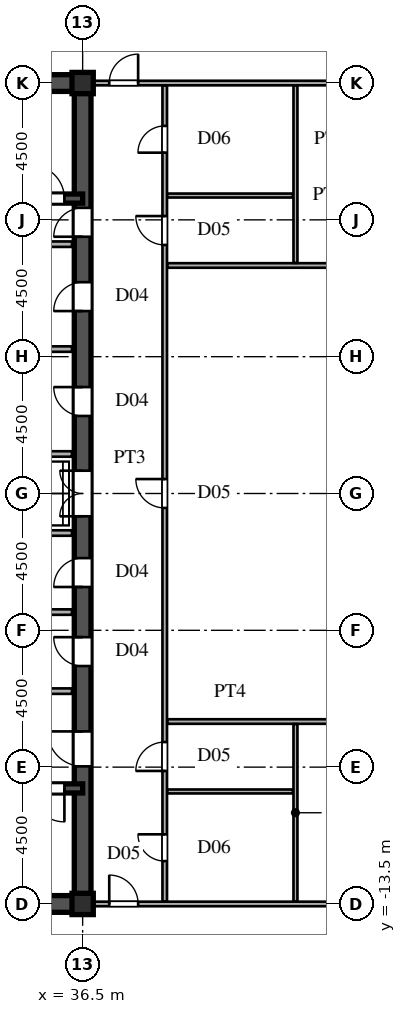
"""IFC4 building model, lengths in metres.
Left out: names, types, materials, properties, quantities, classifications, styles, units other than length and angle.
Written with IfcOpenShell. Run it as: python <this file> out.ifc"""

import sys

from ifc_helpers import new_model, si_unit, direction, frame, frame_2d, origin, origin_2d, place, context, subcontext, project, spatial, rectangle, i_section, extrude, source, transform, mapped, element, fill, save


model = new_model("IFC4")
c1 = context("Model", 3, precision=1e-05, world=origin(), true_north=direction((0.0, 1.0)))
c2 = subcontext(c1, "Body", "Model", "MODEL_VIEW")
j1 = project(units=[si_unit("LENGTHUNIT", "METRE"), si_unit("PLANEANGLEUNIT", "RADIAN")], contexts=[c1])
p1 = place(None, origin())
s1 = spatial("IfcSite", under=j1, at=p1, CompositionType="ELEMENT")
p2 = place(p1, origin())
s2 = spatial("IfcBuilding", under=s1, at=p2, CompositionType="ELEMENT")
p3 = place(p2, frame((0.0, 0.0, 135.6)))
s3 = spatial("IfcBuildingStorey", under=s2, at=p3, CompositionType="ELEMENT", Elevation=135.6)
m1 = source(origin(), c2, "Body", "SweptSolid", [
    extrude(i_section(OverallWidth=0.7, OverallDepth=0.7, WebThickness=0.028, FlangeThickness=0.045, at=origin_2d()), origin(), (0.0, 0.0, 1.0), 4.8),
])
for number, where, z_axis, x_axis in (
    (1, (36.5, -13.5, 0.0), (0.0, 0.0, 1.0), (1.0, 0.0, 0.0)),
    (2, (36.5, 13.5, 0.0), (0.0, 0.0, 1.0), (1.0, 0.0, 0.0)),
):
    element("IfcColumn", number, at=place(p3, frame(where, z_axis=z_axis, x_axis=x_axis)), inside=s3, PredefinedType="COLUMN", context=c2, shape_type="MappedRepresentation", body=[
        mapped(m1, transform((0.0, 0.0, 0.0), scale=1.0)),
    ])
for number, where, z_axis, x_axis in (
    (3, (27.5, -13.5, 0.0), (0.0, 0.0, 1.0), (1.0, 0.0, 0.0)),
    (4, (27.5, 13.5, 0.0), (0.0, 0.0, 1.0), (1.0, 0.0, 0.0)),
):
    element("IfcWall", number, at=place(p3, frame(where, z_axis=z_axis, x_axis=x_axis)), inside=s3, PredefinedType="SHEAR", context=c2, shape_type="SweptSolid", body=[
        extrude(rectangle(XDim=9.0, YDim=0.55, at=frame_2d((4.5, 0.0))), origin(), (0.0, 0.0, 1.0), 4.58),
    ])
p4 = place(p3, frame((36.5, -13.65, 0.0), z_axis=(0.0, 0.0, 1.0), x_axis=(0.0, 1.0, 0.0)))
e5 = element("IfcWall", 5, at=p4, inside=s3, PredefinedType="SHEAR", context=c2, shape_type="SweptSolid", body=[
    extrude(rectangle(XDim=7.15, YDim=0.55, at=frame_2d((3.575, 0.0))), origin(), (0.0, 0.0, 1.0), 4.58),
])
p5 = place(p4, frame((4.675, 0.0, 0.0)))
e6 = element("IfcOpeningElement", 6, at=p5, cuts=e5, PredefinedType="OPENING", context=c2, shape_type="SweptSolid", body=[
    extrude(rectangle(XDim=1.15, YDim=2.2, at=frame_2d((0.575, 1.1))), frame((0.0, 0.285, 0.0), z_axis=(0.0, -1.0, 0.0), x_axis=(1.0, 0.0, 0.0)), (0.0, 0.0, 1.0), 0.57),
])
p6 = place(p3, frame((36.5, -1.3, 0.0), z_axis=(0.0, 0.0, 1.0), x_axis=(0.0, 1.0, 0.0)))
e7 = element("IfcWall", 7, at=p6, inside=s3, PredefinedType="SHEAR", context=c2, shape_type="SweptSolid", body=[
    extrude(rectangle(XDim=2.6, YDim=0.55, at=frame_2d((1.3, 0.0))), origin(), (0.0, 0.0, 1.0), 4.58),
])
p7 = place(p6, frame((0.55, 0.0, 0.0)))
e8 = element("IfcOpeningElement", 8, at=p7, cuts=e7, PredefinedType="OPENING", context=c2, shape_type="SweptSolid", body=[
    extrude(rectangle(XDim=1.5, YDim=2.3, at=frame_2d((0.75, 1.15))), frame((0.0, 0.285, 0.0), z_axis=(0.0, -1.0, 0.0), x_axis=(1.0, 0.0, 0.0)), (0.0, 0.0, 1.0), 0.57),
])
p8 = place(p3, frame((36.5, 8.2, 0.0), z_axis=(0.0, 0.0, 1.0), x_axis=(0.0, 1.0, 0.0)))
e9 = element("IfcWall", 9, at=p8, inside=s3, PredefinedType="SHEAR", context=c2, shape_type="SweptSolid", body=[
    extrude(rectangle(XDim=5.45, YDim=0.55, at=frame_2d((2.725, 0.0))), origin(), (0.0, 0.0, 1.0), 4.58),
])
p9 = place(p8, frame((0.245, 0.0, 0.0)))
e10 = element("IfcOpeningElement", 10, at=p9, cuts=e9, PredefinedType="OPENING", context=c2, shape_type="SweptSolid", body=[
    extrude(rectangle(XDim=0.95, YDim=2.15, at=frame_2d((0.475, 1.075))), frame((0.0, 0.285, 0.0), z_axis=(0.0, -1.0, 0.0), x_axis=(1.0, 0.0, 0.0)), (0.0, 0.0, 1.0), 0.57),
])
p10 = place(p3, frame((36.5, -6.5, 0.0), z_axis=(0.0, 0.0, 1.0), x_axis=(0.0, 1.0, 0.0)))
e11 = element("IfcWall", 11, at=p10, inside=s3, PredefinedType="SHEAR", context=c2, shape_type="SweptSolid", body=[
    extrude(rectangle(XDim=2.6, YDim=0.55, at=frame_2d((1.3, 0.0))), origin(), (0.0, 0.0, 1.0), 4.58),
])
p11 = place(p10, frame((0.825, 0.0, 0.0)))
e12 = element("IfcOpeningElement", 12, at=p11, cuts=e11, PredefinedType="OPENING", context=c2, shape_type="SweptSolid", body=[
    extrude(rectangle(XDim=0.95, YDim=2.15, at=frame_2d((0.475, 1.075))), frame((0.0, 0.285, 0.0), z_axis=(0.0, -1.0, 0.0), x_axis=(1.0, 0.0, 0.0)), (0.0, 0.0, 1.0), 0.57),
])
p12 = place(p3, frame((36.5, -3.9, 0.0), z_axis=(0.0, 0.0, 1.0), x_axis=(0.0, 1.0, 0.0)))
e13 = element("IfcWall", 13, at=p12, inside=s3, PredefinedType="SHEAR", context=c2, shape_type="SweptSolid", body=[
    extrude(rectangle(XDim=2.6, YDim=0.55, at=frame_2d((1.3, 0.0))), origin(), (0.0, 0.0, 1.0), 4.58),
])
p13 = place(p12, frame((0.825, 0.0, 0.0)))
e14 = element("IfcOpeningElement", 14, at=p13, cuts=e13, PredefinedType="OPENING", context=c2, shape_type="SweptSolid", body=[
    extrude(rectangle(XDim=0.95, YDim=2.15, at=frame_2d((0.475, 1.075))), frame((0.0, 0.285, 0.0), z_axis=(0.0, -1.0, 0.0), x_axis=(1.0, 0.0, 0.0)), (0.0, 0.0, 1.0), 0.57),
])
p14 = place(p3, frame((36.5, 1.3, 0.0), z_axis=(0.0, 0.0, 1.0), x_axis=(0.0, 1.0, 0.0)))
e15 = element("IfcWall", 15, at=p14, inside=s3, PredefinedType="SHEAR", context=c2, shape_type="SweptSolid", body=[
    extrude(rectangle(XDim=3.45, YDim=0.55, at=frame_2d((1.725, 0.0))), origin(), (0.0, 0.0, 1.0), 4.58),
])
p15 = place(p14, frame((1.25, 0.0, 0.0)))
e16 = element("IfcOpeningElement", 16, at=p15, cuts=e15, PredefinedType="OPENING", context=c2, shape_type="SweptSolid", body=[
    extrude(rectangle(XDim=0.95, YDim=2.15, at=frame_2d((0.475, 1.075))), frame((0.0, 0.285, 0.0), z_axis=(0.0, -1.0, 0.0), x_axis=(1.0, 0.0, 0.0)), (0.0, 0.0, 1.0), 0.57),
])
p16 = place(p3, frame((36.5, 4.75, 0.0), z_axis=(0.0, 0.0, 1.0), x_axis=(0.0, 1.0, 0.0)))
e17 = element("IfcWall", 17, at=p16, inside=s3, PredefinedType="SHEAR", context=c2, shape_type="SweptSolid", body=[
    extrude(rectangle(XDim=3.45, YDim=0.55, at=frame_2d((1.725, 0.0))), origin(), (0.0, 0.0, 1.0), 4.58),
])
p17 = place(p16, frame((1.25, 0.0, 0.0)))
e18 = element("IfcOpeningElement", 18, at=p17, cuts=e17, PredefinedType="OPENING", context=c2, shape_type="SweptSolid", body=[
    extrude(rectangle(XDim=0.95, YDim=2.15, at=frame_2d((0.475, 1.075))), frame((0.0, 0.285, 0.0), z_axis=(0.0, -1.0, 0.0), x_axis=(1.0, 0.0, 0.0)), (0.0, 0.0, 1.0), 0.57),
])
p18 = place(p3, frame((27.5, -9.7, 0.0), z_axis=(0.0, 0.0, 1.0), x_axis=(1.0, 0.0, 0.0)))
e19 = element("IfcWall", 19, at=p18, inside=s3, PredefinedType="SHEAR", context=c2, shape_type="SweptSolid", body=[
    extrude(rectangle(XDim=9.0, YDim=0.3, at=frame_2d((4.5, 0.0))), origin(), (0.0, 0.0, 1.0), 4.58),
])
p19 = place(p18, frame((7.3, 0.0, 0.0)))
e20 = element("IfcOpeningElement", 20, at=p19, cuts=e19, PredefinedType="OPENING", context=c2, shape_type="SweptSolid", body=[
    extrude(rectangle(XDim=1.1, YDim=2.2, at=frame_2d((0.55, 1.1))), frame((0.0, 0.16, 0.0), z_axis=(0.0, -1.0, 0.0), x_axis=(1.0, 0.0, 0.0)), (0.0, 0.0, 1.0), 0.32),
])
p20 = place(p3, frame((27.5, 9.7, 0.0), z_axis=(0.0, 0.0, 1.0), x_axis=(1.0, 0.0, 0.0)))
e21 = element("IfcWall", 21, at=p20, inside=s3, PredefinedType="SHEAR", context=c2, shape_type="SweptSolid", body=[
    extrude(rectangle(XDim=9.0, YDim=0.3, at=frame_2d((4.5, 0.0))), origin(), (0.0, 0.0, 1.0), 4.58),
])
p21 = place(p20, frame((7.3, 0.0, 0.0)))
e22 = element("IfcOpeningElement", 22, at=p21, cuts=e21, PredefinedType="OPENING", context=c2, shape_type="SweptSolid", body=[
    extrude(rectangle(XDim=1.1, YDim=2.2, at=frame_2d((0.55, 1.1))), frame((0.0, 0.16, 0.0), z_axis=(0.0, -1.0, 0.0), x_axis=(1.0, 0.0, 0.0)), (0.0, 0.0, 1.0), 0.32),
])
for number, where, z_axis, x_axis in (
    (23, (30.45, -6.5, 0.0), (0.0, 0.0, 1.0), (1.0, 0.0, 0.0)),
    (24, (30.45, 8.2, 0.0), (0.0, 0.0, 1.0), (1.0, 0.0, 0.0)),
):
    element("IfcWall", number, at=place(p3, frame(where, z_axis=z_axis, x_axis=x_axis)), inside=s3, PredefinedType="PARTITIONING", context=c2, shape_type="SweptSolid", body=[
        extrude(rectangle(XDim=5.7, YDim=0.18, at=frame_2d((2.85, 0.0))), origin(), (0.0, 0.0, 1.0), 4.58),
    ])
for number, where, z_axis, x_axis in (
    (25, (33.2, -1.3, 0.0), (0.0, 0.0, 1.0), (1.0, 0.0, 0.0)),
    (26, (33.2, 1.3, 0.0), (0.0, 0.0, 1.0), (1.0, 0.0, 0.0)),
    (27, (33.2, -3.9, 0.0), (0.0, 0.0, 1.0), (1.0, 0.0, 0.0)),
    (28, (33.2, 4.75, 0.0), (0.0, 0.0, 1.0), (1.0, 0.0, 0.0)),
):
    element("IfcWall", number, at=place(p3, frame(where, z_axis=z_axis, x_axis=x_axis)), inside=s3, PredefinedType="PARTITIONING", context=c2, shape_type="SweptSolid", body=[
        extrude(rectangle(XDim=2.95, YDim=0.18, at=frame_2d((1.475, 0.0))), origin(), (0.0, 0.0, 1.0), 4.58),
    ])
p22 = place(p3, frame((36.78, -13.5, 0.0), z_axis=(0.0, 0.0, 1.0), x_axis=(1.0, 0.0, 0.0)))
e29 = element("IfcWall", 29, at=p22, inside=s3, PredefinedType="PARTITIONING", context=c2, shape_type="SweptSolid", body=[
    extrude(rectangle(XDim=16.167, YDim=0.15, at=frame_2d((8.083, 0.0))), origin(), (0.0, 0.0, 1.0), 3.98),
])
p23 = place(p22, frame((0.595, 0.0, 0.0)))
e30 = element("IfcOpeningElement", 30, at=p23, cuts=e29, PredefinedType="OPENING", context=c2, shape_type="SweptSolid", body=[
    extrude(rectangle(XDim=0.95, YDim=2.15, at=frame_2d((0.475, 1.075))), frame((0.0, 0.085, 0.0), z_axis=(0.0, -1.0, 0.0), x_axis=(1.0, 0.0, 0.0)), (0.0, 0.0, 1.0), 0.17),
])
p24 = place(p3, frame((39.285, -9.8, 0.0), z_axis=(0.0, 0.0, 1.0), x_axis=(1.0, 0.0, 0.0)))
e31 = element("IfcWall", 31, at=p24, inside=s3, PredefinedType="PARTITIONING", context=c2, shape_type="SweptSolid", body=[
    extrude(rectangle(XDim=4.13, YDim=0.13, at=frame_2d((2.065, 0.0))), origin(), (0.0, 0.0, 1.0), 4.58),
])
p25 = place(p3, frame((39.285, -7.5, 0.0), z_axis=(0.0, 0.0, 1.0), x_axis=(1.0, 0.0, 0.0)))
e32 = element("IfcWall", 32, at=p25, inside=s3, PredefinedType="PARTITIONING", context=c2, shape_type="SweptSolid", body=[
    extrude(rectangle(XDim=25.354, YDim=0.15, at=frame_2d((12.677, 0.0))), origin(), (0.0, 0.0, 1.0), 4.58),
])
p26 = place(p25, frame((9.49, 0.0, 0.0)))
e33 = element("IfcOpeningElement", 33, at=p26, cuts=e32, PredefinedType="OPENING", context=c2, shape_type="SweptSolid", body=[
    extrude(rectangle(XDim=0.95, YDim=2.15, at=frame_2d((0.475, 1.075))), frame((0.0, 0.085, 0.0), z_axis=(0.0, -1.0, 0.0), x_axis=(1.0, 0.0, 0.0)), (0.0, 0.0, 1.0), 0.17),
])
p27 = place(p3, frame((39.285, 7.5, 0.0), z_axis=(0.0, 0.0, 1.0), x_axis=(1.0, 0.0, 0.0)))
e34 = element("IfcWall", 34, at=p27, inside=s3, PredefinedType="PARTITIONING", context=c2, shape_type="SweptSolid", body=[
    extrude(rectangle(XDim=25.354, YDim=0.15, at=frame_2d((12.677, 0.0))), origin(), (0.0, 0.0, 1.0), 4.58),
])
p28 = place(p27, frame((9.49, 0.0, 0.0)))
e35 = element("IfcOpeningElement", 35, at=p28, cuts=e34, PredefinedType="OPENING", context=c2, shape_type="SweptSolid", body=[
    extrude(rectangle(XDim=0.95, YDim=2.15, at=frame_2d((0.475, 1.075))), frame((0.0, 0.085, 0.0), z_axis=(0.0, -1.0, 0.0), x_axis=(1.0, 0.0, 0.0)), (0.0, 0.0, 1.0), 0.17),
])
p29 = place(p3, frame((39.285, 9.8, 0.0), z_axis=(0.0, 0.0, 1.0), x_axis=(1.0, 0.0, 0.0)))
e36 = element("IfcWall", 36, at=p29, inside=s3, PredefinedType="PARTITIONING", context=c2, shape_type="SweptSolid", body=[
    extrude(rectangle(XDim=4.13, YDim=0.13, at=frame_2d((2.065, 0.0))), origin(), (0.0, 0.0, 1.0), 4.58),
])
p30 = place(p3, frame((36.78, 13.5, 0.0), z_axis=(0.0, 0.0, 1.0), x_axis=(1.0, 0.0, 0.0)))
e37 = element("IfcWall", 37, at=p30, inside=s3, PredefinedType="PARTITIONING", context=c2, shape_type="SweptSolid", body=[
    extrude(rectangle(XDim=16.167, YDim=0.15, at=frame_2d((8.083, 0.0))), origin(), (0.0, 0.0, 1.0), 3.98),
])
p31 = place(p30, frame((0.595, 0.0, 0.0)))
e38 = element("IfcOpeningElement", 38, at=p31, cuts=e37, PredefinedType="OPENING", context=c2, shape_type="SweptSolid", body=[
    extrude(rectangle(XDim=0.95, YDim=2.15, at=frame_2d((0.475, 1.075))), frame((0.0, 0.085, 0.0), z_axis=(0.0, -1.0, 0.0), x_axis=(1.0, 0.0, 0.0)), (0.0, 0.0, 1.0), 0.17),
])
p32 = place(p3, frame((39.2, -13.415, 0.0), z_axis=(0.0, 0.0, 1.0), x_axis=(0.0, 1.0, 0.0)))
e39 = element("IfcWall", 39, at=p32, inside=s3, PredefinedType="PARTITIONING", context=c2, shape_type="SweptSolid", body=[
    extrude(rectangle(XDim=26.83, YDim=0.15, at=frame_2d((13.415, 0.0))), origin(), (0.0, 0.0, 1.0), 4.58),
])
p33 = place(p32, frame((12.94, 0.0, 0.0)))
e40 = element("IfcOpeningElement", 40, at=p33, cuts=e39, PredefinedType="OPENING", context=c2, shape_type="SweptSolid", body=[
    extrude(rectangle(XDim=0.95, YDim=2.15, at=frame_2d((0.475, 1.075))), frame((0.0, 0.085, 0.0), z_axis=(0.0, -1.0, 0.0), x_axis=(1.0, 0.0, 0.0)), (0.0, 0.0, 1.0), 0.17),
])
p34 = place(p32, frame((1.325, 0.0, 0.0)))
e41 = element("IfcOpeningElement", 41, at=p34, cuts=e39, PredefinedType="OPENING", context=c2, shape_type="SweptSolid", body=[
    extrude(rectangle(XDim=0.88, YDim=2.1, at=frame_2d((0.44, 1.05))), frame((0.0, 0.085, 0.0), z_axis=(0.0, -1.0, 0.0), x_axis=(1.0, 0.0, 0.0)), (0.0, 0.0, 1.0), 0.17),
])
p35 = place(p32, frame((4.29, 0.0, 0.0)))
e42 = element("IfcOpeningElement", 42, at=p35, cuts=e39, PredefinedType="OPENING", context=c2, shape_type="SweptSolid", body=[
    extrude(rectangle(XDim=0.95, YDim=2.15, at=frame_2d((0.475, 1.075))), frame((0.0, 0.085, 0.0), z_axis=(0.0, -1.0, 0.0), x_axis=(1.0, 0.0, 0.0)), (0.0, 0.0, 1.0), 0.17),
])
p36 = place(p32, frame((21.59, 0.0, 0.0)))
e43 = element("IfcOpeningElement", 43, at=p36, cuts=e39, PredefinedType="OPENING", context=c2, shape_type="SweptSolid", body=[
    extrude(rectangle(XDim=0.95, YDim=2.15, at=frame_2d((0.475, 1.075))), frame((0.0, 0.085, 0.0), z_axis=(0.0, -1.0, 0.0), x_axis=(1.0, 0.0, 0.0)), (0.0, 0.0, 1.0), 0.17),
])
p37 = place(p32, frame((24.625, 0.0, 0.0)))
e44 = element("IfcOpeningElement", 44, at=p37, cuts=e39, PredefinedType="OPENING", context=c2, shape_type="SweptSolid", body=[
    extrude(rectangle(XDim=0.88, YDim=2.1, at=frame_2d((0.44, 1.05))), frame((0.0, 0.085, 0.0), z_axis=(0.0, -1.0, 0.0), x_axis=(1.0, 0.0, 0.0)), (0.0, 0.0, 1.0), 0.17),
])
for number, where, z_axis, x_axis in (
    (45, (43.5, -13.415, 0.0), (0.0, 0.0, 1.0), (0.0, 1.0, 0.0)),
    (46, (43.5, 7.585, 0.0), (0.0, 0.0, 1.0), (0.0, 1.0, 0.0)),
):
    element("IfcWall", number, at=place(p3, frame(where, z_axis=z_axis, x_axis=x_axis)), inside=s3, PredefinedType="PARTITIONING", context=c2, shape_type="SweptSolid", body=[
        extrude(rectangle(XDim=5.83, YDim=0.13, at=frame_2d((2.915, 0.0))), origin(), (0.0, 0.0, 1.0), 4.58),
    ])
m2 = source(origin(), c2, "Body", "SweptSolid", [
    extrude(rectangle(XDim=1.15, YDim=2.2, at=frame_2d((0.575, 1.1))), frame((0.0, 0.025, 0.0), z_axis=(0.0, -1.0, 0.0), x_axis=(1.0, 0.0, 0.0)), (0.0, 0.0, 1.0), 0.05),
])
p38 = place(p5, origin())
e47 = element("IfcDoor", 47, at=p38, inside=s3, OperationType="SINGLE_SWING_RIGHT", PredefinedType="DOOR", context=c2, shape_type="MappedRepresentation", body=[
    mapped(m2, transform((0.0, 0.0, 0.0), scale=1.0)),
])
fill(e6, e47)
m3 = source(origin(), c2, "Body", "SweptSolid", [
    extrude(rectangle(XDim=1.5, YDim=2.3, at=frame_2d((0.75, 1.15))), frame((0.0, 0.025, 0.0), z_axis=(0.0, -1.0, 0.0), x_axis=(1.0, 0.0, 0.0)), (0.0, 0.0, 1.0), 0.05),
])
p39 = place(p7, origin())
e48 = element("IfcDoor", 48, at=p39, inside=s3, OperationType="DOUBLE_SWING_LEFT", PredefinedType="DOOR", context=c2, shape_type="MappedRepresentation", body=[
    mapped(m3, transform((0.0, 0.0, 0.0), scale=1.0)),
])
fill(e8, e48)
m4 = source(origin(), c2, "Body", "SweptSolid", [
    extrude(rectangle(XDim=0.95, YDim=2.15, at=frame_2d((0.475, 1.075))), frame((0.0, 0.025, 0.0), z_axis=(0.0, -1.0, 0.0), x_axis=(1.0, 0.0, 0.0)), (0.0, 0.0, 1.0), 0.05),
])
p40 = place(p9, origin())
e49 = element("IfcDoor", 49, at=p40, inside=s3, OperationType="SINGLE_SWING_LEFT", PredefinedType="DOOR", context=c2, shape_type="MappedRepresentation", body=[
    mapped(m4, transform((0.0, 0.0, 0.0), scale=1.0)),
])
fill(e10, e49)
p41 = place(p11, origin())
e50 = element("IfcDoor", 50, at=p41, inside=s3, OperationType="SINGLE_SWING_RIGHT", PredefinedType="DOOR", context=c2, shape_type="MappedRepresentation", body=[
    mapped(m4, transform((0.0, 0.0, 0.0), scale=1.0)),
])
fill(e12, e50)
p42 = place(p13, origin())
e51 = element("IfcDoor", 51, at=p42, inside=s3, OperationType="SINGLE_SWING_LEFT", PredefinedType="DOOR", context=c2, shape_type="MappedRepresentation", body=[
    mapped(m4, transform((0.0, 0.0, 0.0), scale=1.0)),
])
fill(e14, e51)
p43 = place(p15, origin())
e52 = element("IfcDoor", 52, at=p43, inside=s3, OperationType="SINGLE_SWING_RIGHT", PredefinedType="DOOR", context=c2, shape_type="MappedRepresentation", body=[
    mapped(m4, transform((0.0, 0.0, 0.0), scale=1.0)),
])
fill(e16, e52)
p44 = place(p17, origin())
e53 = element("IfcDoor", 53, at=p44, inside=s3, OperationType="SINGLE_SWING_LEFT", PredefinedType="DOOR", context=c2, shape_type="MappedRepresentation", body=[
    mapped(m4, transform((0.0, 0.0, 0.0), scale=1.0)),
])
fill(e18, e53)
m5 = source(origin(), c2, "Body", "SweptSolid", [
    extrude(rectangle(XDim=1.1, YDim=2.2, at=frame_2d((0.55, 1.1))), frame((0.0, 0.025, 0.0), z_axis=(0.0, -1.0, 0.0), x_axis=(1.0, 0.0, 0.0)), (0.0, 0.0, 1.0), 0.05),
])
p45 = place(p19, frame((1.1, 0.0, 0.0), z_axis=(0.0, 0.0, 1.0), x_axis=(-1.0, 0.0, 0.0)))
e54 = element("IfcDoor", 54, at=p45, inside=s3, OperationType="SINGLE_SWING_RIGHT", PredefinedType="DOOR", context=c2, shape_type="MappedRepresentation", body=[
    mapped(m5, transform((0.0, 0.0, 0.0), scale=1.0)),
])
fill(e20, e54)
p46 = place(p21, origin())
e55 = element("IfcDoor", 55, at=p46, inside=s3, OperationType="SINGLE_SWING_LEFT", PredefinedType="DOOR", context=c2, shape_type="MappedRepresentation", body=[
    mapped(m5, transform((0.0, 0.0, 0.0), scale=1.0)),
])
fill(e22, e55)
m6 = source(origin(), c2, "Body", "SweptSolid", [
    extrude(rectangle(XDim=0.95, YDim=2.15, at=frame_2d((0.475, 1.075))), frame((0.0, 0.025, 0.0), z_axis=(0.0, -1.0, 0.0), x_axis=(1.0, 0.0, 0.0)), (0.0, 0.0, 1.0), 0.05),
])
p47 = place(p23, origin())
e56 = element("IfcDoor", 56, at=p47, inside=s3, OperationType="SINGLE_SWING_LEFT", PredefinedType="DOOR", context=c2, shape_type="MappedRepresentation", body=[
    mapped(m6, transform((0.0, 0.0, 0.0), scale=1.0)),
])
fill(e30, e56)
p48 = place(p31, origin())
e57 = element("IfcDoor", 57, at=p48, inside=s3, OperationType="SINGLE_SWING_RIGHT", PredefinedType="DOOR", context=c2, shape_type="MappedRepresentation", body=[
    mapped(m6, transform((0.0, 0.0, 0.0), scale=1.0)),
])
fill(e38, e57)
p49 = place(p33, origin())
e58 = element("IfcDoor", 58, at=p49, inside=s3, OperationType="SINGLE_SWING_RIGHT", PredefinedType="DOOR", context=c2, shape_type="MappedRepresentation", body=[
    mapped(m6, transform((0.0, 0.0, 0.0), scale=1.0)),
])
fill(e40, e58)
m7 = source(origin(), c2, "Body", "SweptSolid", [
    extrude(rectangle(XDim=0.88, YDim=2.1, at=frame_2d((0.44, 1.05))), frame((0.0, 0.025, 0.0), z_axis=(0.0, -1.0, 0.0), x_axis=(1.0, 0.0, 0.0)), (0.0, 0.0, 1.0), 0.05),
])
p50 = place(p34, origin())
e59 = element("IfcDoor", 59, at=p50, inside=s3, OperationType="SINGLE_SWING_RIGHT", PredefinedType="DOOR", context=c2, shape_type="MappedRepresentation", body=[
    mapped(m7, transform((0.0, 0.0, 0.0), scale=1.0)),
])
fill(e41, e59)
p51 = place(p35, origin())
e60 = element("IfcDoor", 60, at=p51, inside=s3, OperationType="SINGLE_SWING_LEFT", PredefinedType="DOOR", context=c2, shape_type="MappedRepresentation", body=[
    mapped(m6, transform((0.0, 0.0, 0.0), scale=1.0)),
])
fill(e42, e60)
p52 = place(p36, origin())
e61 = element("IfcDoor", 61, at=p52, inside=s3, OperationType="SINGLE_SWING_RIGHT", PredefinedType="DOOR", context=c2, shape_type="MappedRepresentation", body=[
    mapped(m6, transform((0.0, 0.0, 0.0), scale=1.0)),
])
fill(e43, e61)
p53 = place(p37, origin())
e62 = element("IfcDoor", 62, at=p53, inside=s3, OperationType="SINGLE_SWING_LEFT", PredefinedType="DOOR", context=c2, shape_type="MappedRepresentation", body=[
    mapped(m7, transform((0.0, 0.0, 0.0), scale=1.0)),
])
fill(e44, e62)
save(model, sys.argv[1])
